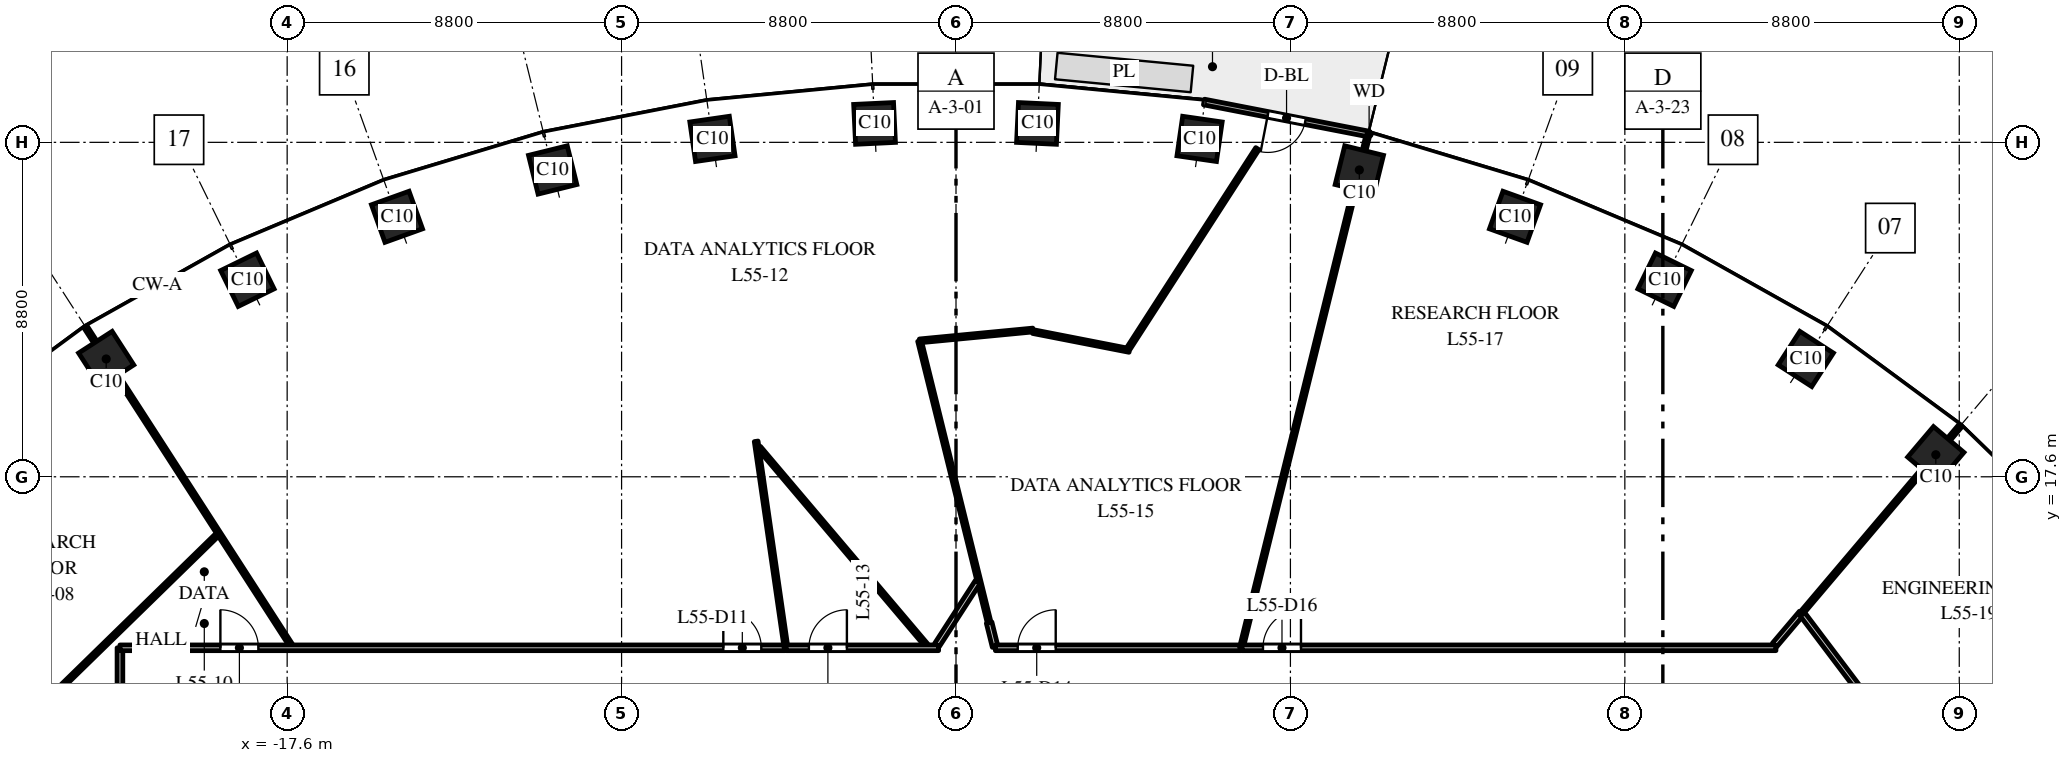
"""IFC4 building model, lengths in metres.
Left out: names, types, materials, properties, quantities, classifications, styles, units other than length and angle.
Written with IfcOpenShell. Run it as: python <this file> out.ifc"""

import sys

from ifc_helpers import new_model, si_unit, direction, frame, frame_2d, origin, origin_2d, place, context, subcontext, project, spatial, rectangle, extrude, element, fill, save


model = new_model("IFC4")
c1 = context("Model", 3, precision=1e-05, world=origin(), true_north=direction((0.0, 1.0)))
c2 = subcontext(c1, "Body", "Model", "MODEL_VIEW")
j1 = project(units=[si_unit("LENGTHUNIT", "METRE"), si_unit("PLANEANGLEUNIT", "RADIAN")], contexts=[c1])
p1 = place(None, origin())
s1 = spatial("IfcSite", under=j1, at=p1, CompositionType="ELEMENT")
p2 = place(p1, origin())
s2 = spatial("IfcBuilding", under=s1, at=p2, CompositionType="ELEMENT")
p3 = place(p2, frame((0.0, 0.0, 261.5)))
s3 = spatial("IfcBuildingStorey", under=s2, at=p3, CompositionType="ELEMENT", Elevation=261.5)
for number, where, z_axis, x_axis in (
    (1, (25.783, 18.18, 0.0), (0.0, 0.0, 1.0), (-0.763, 0.646, 0.0)),
    (2, (22.362, 20.7, 0.0), (0.0, 0.0, 1.0), (-0.84, 0.542, 0.0)),
    (3, (18.646, 22.785, 0.0), (0.0, 0.0, 1.0), (-0.898, 0.439, 0.0)),
    (4, (14.709, 24.441, 0.0), (0.0, 0.0, 1.0), (-0.941, 0.338, 0.0)),
    (5, (10.613, 25.674, 0.0), (0.0, 0.0, 1.0), (-0.971, 0.24, 0.0)),
    (6, (6.409, 26.491, 0.0), (0.0, 0.0, 1.0), (-0.99, 0.143, 0.0)),
    (7, (2.143, 26.898, 0.0), (0.0, 0.0, 1.0), (-0.999, 0.048, 0.0)),
    (8, (-2.143, 26.898, 0.0), (0.0, 0.0, 1.0), (-0.999, -0.048, 0.0)),
    (9, (-6.409, 26.491, 0.0), (0.0, 0.0, 1.0), (-0.99, -0.143, 0.0)),
    (10, (-10.613, 25.674, 0.0), (0.0, 0.0, 1.0), (-0.971, -0.24, 0.0)),
    (11, (-14.709, 24.441, 0.0), (0.0, 0.0, 1.0), (-0.941, -0.338, 0.0)),
    (12, (-18.646, 22.785, 0.0), (0.0, 0.0, 1.0), (-0.898, -0.439, 0.0)),
    (13, (-22.362, 20.7, 0.0), (0.0, 0.0, 1.0), (-0.84, -0.542, 0.0)),
):
    element("IfcColumn", number, at=place(p3, frame(where, z_axis=z_axis, x_axis=x_axis)), inside=s3, PredefinedType="COLUMN", context=c2, shape_type="SweptSolid", body=[
        extrude(rectangle(XDim=1.05, YDim=1.05, at=origin_2d()), origin(), (0.0, 0.0, 1.0), 4.0),
    ])
p4 = place(p3, frame((10.871, 26.617, 0.0), z_axis=(0.0, 0.0, 1.0), x_axis=(-0.981631174778, 0.190788460615, 0.0)))
e14 = element("IfcWall", 14, at=p4, inside=s3, PredefinedType="STANDARD", context=c2, shape_type="SweptSolid", body=[
    extrude(rectangle(XDim=4.426, YDim=0.15, at=frame_2d((2.213, 0.0))), origin(), (0.0, 0.0, 1.0), 3.7),
])
p5 = place(p4, frame((1.713, 0.0, 0.0)))
e15 = element("IfcOpeningElement", 15, at=p5, cuts=e14, PredefinedType="OPENING", context=c2, shape_type="SweptSolid", body=[
    extrude(rectangle(XDim=1.0, YDim=2.4, at=frame_2d((0.5, 1.2))), frame((0.0, 0.085, 0.0), z_axis=(0.0, -1.0, 0.0), x_axis=(1.0, 0.0, 0.0)), (0.0, 0.0, 1.0), 0.17),
])
p6 = place(p3, frame((-24.866, 10.778, 0.0), z_axis=(0.0, 0.0, 1.0), x_axis=(0.715632814242, 0.698476681916, 0.0)))
e16 = element("IfcWall", 16, at=p6, inside=s3, PredefinedType="PARTITIONING", context=c2, shape_type="SweptSolid", body=[
    extrude(rectangle(XDim=7.585, YDim=0.1, at=frame_2d((3.792, 0.0))), origin(), (0.0, 0.0, 1.0), 2.75),
])
p7 = place(p3, frame((-22.905, 21.542, 0.0), z_axis=(0.0, 0.0, 1.0), x_axis=(0.542277075573, -0.840199722273, 0.0)))
e17 = element("IfcWall", 17, at=p7, inside=s3, PredefinedType="PARTITIONING", context=c2, shape_type="SweptSolid", body=[
    extrude(rectangle(XDim=9.958, YDim=0.1, at=frame_2d((4.979, 0.0))), origin(), (0.0, 0.0, 1.0), 3.0),
])
p8 = place(p3, frame((-22.0, 10.7, 0.0), z_axis=(0.0, 0.0, 1.0), x_axis=(0.0, 1.0, 0.0)))
e18 = element("IfcWall", 18, at=p8, inside=s3, PredefinedType="PARTITIONING", context=c2, shape_type="SweptSolid", body=[
    extrude(rectangle(XDim=2.4, YDim=0.15, at=frame_2d((1.2, 0.0))), origin(), (0.0, 0.0, 1.0), 3.7),
])
p9 = place(p3, frame((-22.0, 13.1, 0.0), z_axis=(0.0, 0.0, 1.0), x_axis=(1.0, 0.0, 0.0)))
e19 = element("IfcWall", 19, at=p9, inside=s3, PredefinedType="PARTITIONING", context=c2, shape_type="SweptSolid", body=[
    extrude(rectangle(XDim=17.507, YDim=0.15, at=frame_2d((8.753, 0.0))), origin(), (0.0, 0.0, 1.0), 2.75),
])
p10 = place(p9, frame((2.643, 0.0, 0.0)))
e20 = element("IfcOpeningElement", 20, at=p10, cuts=e19, PredefinedType="OPENING", context=c2, shape_type="SweptSolid", body=[
    extrude(rectangle(XDim=1.0, YDim=2.1, at=frame_2d((0.5, 1.05))), frame((0.0, 0.085, 0.0), z_axis=(0.0, -1.0, 0.0), x_axis=(1.0, 0.0, 0.0)), (0.0, 0.0, 1.0), 0.17),
])
p11 = place(p9, frame((15.877, 0.0, 0.0)))
e21 = element("IfcOpeningElement", 21, at=p11, cuts=e19, PredefinedType="OPENING", context=c2, shape_type="SweptSolid", body=[
    extrude(rectangle(XDim=1.0, YDim=2.1, at=frame_2d((0.5, 1.05))), frame((0.0, 0.085, 0.0), z_axis=(0.0, -1.0, 0.0), x_axis=(1.0, 0.0, 0.0)), (0.0, 0.0, 1.0), 0.17),
])
p12 = place(p3, frame((-5.258, 18.533, 0.0), z_axis=(0.0, 0.0, 1.0), x_axis=(0.143033857536, -0.989717795939, 0.0)))
e22 = element("IfcWall", 22, at=p12, inside=s3, PredefinedType="PARTITIONING", context=c2, shape_type="SweptSolid", body=[
    extrude(rectangle(XDim=5.489, YDim=0.1, at=frame_2d((2.745, 0.0))), origin(), (0.0, 0.0, 1.0), 3.7),
])
p13 = place(p3, frame((-5.184, 18.368, 0.0), z_axis=(0.0, 0.0, 1.0), x_axis=(0.646387569677, -0.763009246187, 0.0)))
e23 = element("IfcWall", 23, at=p13, inside=s3, PredefinedType="PARTITIONING", context=c2, shape_type="SweptSolid", body=[
    extrude(rectangle(XDim=6.806, YDim=0.1, at=frame_2d((3.403, 0.0))), origin(), (0.0, 0.0, 1.0), 2.85),
])
p14 = place(p3, frame((-4.473, 13.1, 0.0), z_axis=(0.0, 0.0, 1.0), x_axis=(1.0, 0.0, 0.0)))
e24 = element("IfcWall", 24, at=p14, inside=s3, PredefinedType="PARTITIONING", context=c2, shape_type="SweptSolid", body=[
    extrude(rectangle(XDim=4.015, YDim=0.15, at=frame_2d((2.007, 0.0))), origin(), (0.0, 0.0, 1.0), 2.85),
])
p15 = place(p14, frame((0.602, 0.0, 0.0)))
e25 = element("IfcOpeningElement", 25, at=p15, cuts=e24, PredefinedType="OPENING", context=c2, shape_type="SweptSolid", body=[
    extrude(rectangle(XDim=1.0, YDim=2.1, at=frame_2d((0.5, 1.05))), frame((0.0, 0.085, 0.0), z_axis=(0.0, -1.0, 0.0), x_axis=(1.0, 0.0, 0.0)), (0.0, 0.0, 1.0), 0.17),
])
p16 = place(p3, frame((-0.959, 21.176, 0.0), z_axis=(0.0, 0.0, 1.0), x_axis=(0.239857253037, -0.970808167542, 0.0)))
e26 = element("IfcWall", 26, at=p16, inside=s3, PredefinedType="PARTITIONING", context=c2, shape_type="SweptSolid", body=[
    extrude(rectangle(XDim=7.638, YDim=0.1, at=frame_2d((3.819, 0.0))), origin(), (0.0, 0.0, 1.0), 3.7),
])
p17 = place(p3, frame((-0.959, 21.176, 0.0), z_axis=(0.0, 0.0, 1.0), x_axis=(0.995444464517, 0.095343159492, 0.0)))
e27 = element("IfcWall", 27, at=p17, inside=s3, PredefinedType="PARTITIONING", context=c2, shape_type="SweptSolid", body=[
    extrude(rectangle(XDim=2.999, YDim=0.1, at=frame_2d((1.499, 0.0))), origin(), (0.0, 0.0, 1.0), 3.7),
])
p18 = place(p3, frame((-0.499, 13.175, 0.0), z_axis=(0.0, 0.0, 1.0), x_axis=(0.542727480909, 0.83990885307, 0.0)))
e28 = element("IfcWall", 28, at=p18, inside=s3, PredefinedType="PARTITIONING", context=c2, shape_type="SweptSolid", body=[
    extrude(rectangle(XDim=1.972, YDim=0.15, at=frame_2d((0.986, 0.0))), origin(), (0.0, 0.0, 1.0), 3.7),
])
p19 = place(p3, frame((0.872, 13.761, 0.0), z_axis=(0.0, 0.0, 1.0), x_axis=(0.241387149241, -0.970428897025, 0.0)))
e29 = element("IfcWall", 29, at=p19, inside=s3, PredefinedType="PARTITIONING", context=c2, shape_type="SweptSolid", body=[
    extrude(rectangle(XDim=0.65, YDim=0.15, at=frame_2d((0.325, 0.0))), origin(), (0.0, 0.0, 1.0), 3.7),
])
p20 = place(p3, frame((1.036, 13.1, 0.0), z_axis=(0.0, 0.0, 1.0), x_axis=(1.0, 0.0, 0.0)))
e30 = element("IfcWall", 30, at=p20, inside=s3, PredefinedType="PARTITIONING", context=c2, shape_type="SweptSolid", body=[
    extrude(rectangle(XDim=6.471, YDim=0.15, at=frame_2d((3.236, 0.0))), origin(), (0.0, 0.0, 1.0), 2.85),
])
p21 = place(p20, frame((0.588, 0.0, 0.0)))
e31 = element("IfcOpeningElement", 31, at=p21, cuts=e30, PredefinedType="OPENING", context=c2, shape_type="SweptSolid", body=[
    extrude(rectangle(XDim=1.0, YDim=2.1, at=frame_2d((0.5, 1.05))), frame((0.0, 0.085, 0.0), z_axis=(0.0, -1.0, 0.0), x_axis=(1.0, 0.0, 0.0)), (0.0, 0.0, 1.0), 0.17),
])
p22 = place(p3, frame((2.024, 21.421, 0.0), z_axis=(0.0, 0.0, 1.0), x_axis=(0.981459861459, -0.191667786406, 0.0)))
e32 = element("IfcWall", 32, at=p22, inside=s3, PredefinedType="PARTITIONING", context=c2, shape_type="SweptSolid", body=[
    extrude(rectangle(XDim=2.587, YDim=0.1, at=frame_2d((1.293, 0.0))), origin(), (0.0, 0.0, 1.0), 3.7),
])
p23 = place(p3, frame((4.539, 20.98, 0.0), z_axis=(0.0, 0.0, 1.0), x_axis=(0.542305592802, 0.840181316155, 0.0)))
e33 = element("IfcWall", 33, at=p23, inside=s3, PredefinedType="PARTITIONING", context=c2, shape_type="SweptSolid", body=[
    extrude(rectangle(XDim=6.254, YDim=0.1, at=frame_2d((3.127, 0.0))), origin(), (0.0, 0.0, 1.0), 2.85),
])
p24 = place(p3, frame((7.509, 13.1, 0.0), z_axis=(0.0, 0.0, 1.0), x_axis=(0.239669025128, 0.970854653588, 0.0)))
e34 = element("IfcWall", 34, at=p24, inside=s3, PredefinedType="PARTITIONING", context=c2, shape_type="SweptSolid", body=[
    extrude(rectangle(XDim=13.953, YDim=0.1, at=frame_2d((6.976, 0.0))), origin(), (0.0, 0.0, 1.0), 3.0),
])
p25 = place(p3, frame((7.524, 13.1, 0.0), z_axis=(0.0, 0.0, 1.0), x_axis=(1.0, 0.0, 0.0)))
e35 = element("IfcWall", 35, at=p25, inside=s3, PredefinedType="PARTITIONING", context=c2, shape_type="SweptSolid", body=[
    extrude(rectangle(XDim=14.052, YDim=0.15, at=frame_2d((7.026, 0.0))), origin(), (0.0, 0.0, 1.0), 2.85),
])
p26 = place(p25, frame((0.554, 0.0, 0.0)))
e36 = element("IfcOpeningElement", 36, at=p26, cuts=e35, PredefinedType="OPENING", context=c2, shape_type="SweptSolid", body=[
    extrude(rectangle(XDim=1.0, YDim=2.1, at=frame_2d((0.5, 1.05))), frame((0.0, 0.085, 0.0), z_axis=(0.0, -1.0, 0.0), x_axis=(1.0, 0.0, 0.0)), (0.0, 0.0, 1.0), 0.17),
])
p27 = place(p3, frame((21.541, 13.175, 0.0), z_axis=(0.0, 0.0, 1.0), x_axis=(0.646460291141, 0.762947633837, 0.0)))
e37 = element("IfcWall", 37, at=p27, inside=s3, PredefinedType="PARTITIONING", context=c2, shape_type="SweptSolid", body=[
    extrude(rectangle(XDim=1.098, YDim=0.15, at=frame_2d((0.549, 0.0))), origin(), (0.0, 0.0, 1.0), 3.7),
])
p28 = place(p3, frame((22.251, 14.013, 0.0), z_axis=(0.0, 0.0, 1.0), x_axis=(0.602435944628, -0.798167233492, 0.0)))
e38 = element("IfcWall", 38, at=p28, inside=s3, PredefinedType="PARTITIONING", context=c2, shape_type="SweptSolid", body=[
    extrude(rectangle(XDim=4.245, YDim=0.15, at=frame_2d((2.122, 0.0))), origin(), (0.0, 0.0, 1.0), 2.75),
])
p29 = place(p3, frame((22.251, 14.013, 0.0), z_axis=(0.0, 0.0, 1.0), x_axis=(0.646448300096, 0.76295779392, 0.0)))
e39 = element("IfcWall", 39, at=p29, inside=s3, PredefinedType="PARTITIONING", context=c2, shape_type="SweptSolid", body=[
    extrude(rectangle(XDim=6.465, YDim=0.1, at=frame_2d((3.232, 0.0))), origin(), (0.0, 0.0, 1.0), 3.0),
])
p30 = place(p5, origin())
e40 = element("IfcDoor", 40, at=p30, inside=s3, OperationType="SINGLE_SWING_RIGHT", PredefinedType="DOOR", context=c2, shape_type="SweptSolid", body=[
    extrude(rectangle(XDim=1.0, YDim=2.4, at=frame_2d((0.5, 1.2))), frame((0.0, 0.025, 0.0), z_axis=(0.0, -1.0, 0.0), x_axis=(1.0, 0.0, 0.0)), (0.0, 0.0, 1.0), 0.05),
])
fill(e15, e40)
p31 = place(p10, origin())
e41 = element("IfcDoor", 41, at=p31, inside=s3, OperationType="SINGLE_SWING_LEFT", PredefinedType="DOOR", context=c2, shape_type="SweptSolid", body=[
    extrude(rectangle(XDim=1.0, YDim=2.1, at=frame_2d((0.5, 1.05))), frame((0.0, 0.025, 0.0), z_axis=(0.0, -1.0, 0.0), x_axis=(1.0, 0.0, 0.0)), (0.0, 0.0, 1.0), 0.05),
])
fill(e20, e41)
p32 = place(p11, origin())
e42 = element("IfcDoor", 42, at=p32, inside=s3, OperationType="SINGLE_SWING_LEFT", PredefinedType="DOOR", context=c2, shape_type="SweptSolid", body=[
    extrude(rectangle(XDim=1.0, YDim=2.1, at=frame_2d((0.5, 1.05))), frame((0.0, 0.025, 0.0), z_axis=(0.0, -1.0, 0.0), x_axis=(1.0, 0.0, 0.0)), (0.0, 0.0, 1.0), 0.05),
])
fill(e21, e42)
p33 = place(p15, origin())
e43 = element("IfcDoor", 43, at=p33, inside=s3, OperationType="SINGLE_SWING_RIGHT", PredefinedType="DOOR", context=c2, shape_type="SweptSolid", body=[
    extrude(rectangle(XDim=1.0, YDim=2.1, at=frame_2d((0.5, 1.05))), frame((0.0, 0.025, 0.0), z_axis=(0.0, -1.0, 0.0), x_axis=(1.0, 0.0, 0.0)), (0.0, 0.0, 1.0), 0.05),
])
fill(e25, e43)
p34 = place(p21, origin())
e44 = element("IfcDoor", 44, at=p34, inside=s3, OperationType="SINGLE_SWING_RIGHT", PredefinedType="DOOR", context=c2, shape_type="SweptSolid", body=[
    extrude(rectangle(XDim=1.0, YDim=2.1, at=frame_2d((0.5, 1.05))), frame((0.0, 0.025, 0.0), z_axis=(0.0, -1.0, 0.0), x_axis=(1.0, 0.0, 0.0)), (0.0, 0.0, 1.0), 0.05),
])
fill(e31, e44)
p35 = place(p26, origin())
e45 = element("IfcDoor", 45, at=p35, inside=s3, OperationType="SINGLE_SWING_RIGHT", PredefinedType="DOOR", context=c2, shape_type="SweptSolid", body=[
    extrude(rectangle(XDim=1.0, YDim=2.1, at=frame_2d((0.5, 1.05))), frame((0.0, 0.025, 0.0), z_axis=(0.0, -1.0, 0.0), x_axis=(1.0, 0.0, 0.0)), (0.0, 0.0, 1.0), 0.05),
])
fill(e36, e45)
save(model, sys.argv[1])
